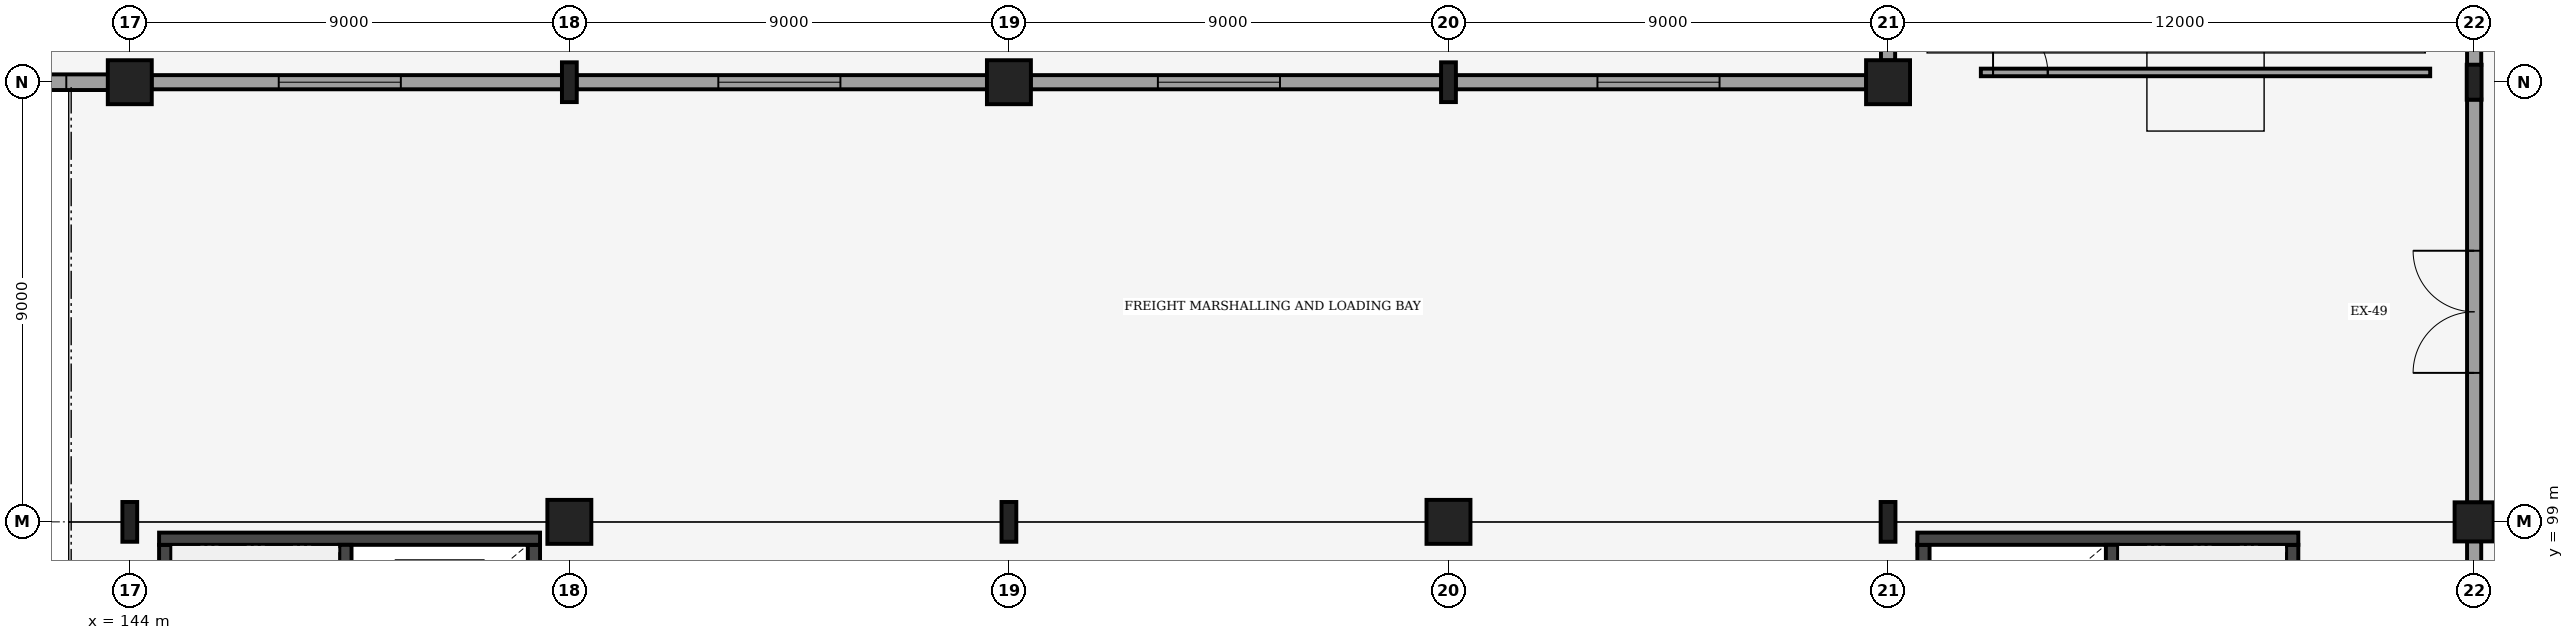
"""IFC4 building model, lengths in metres.
Left out: names, types, materials, properties, quantities, classifications, styles, units other than length and angle.
Written with IfcOpenShell. Run it as: python <this file> out.ifc"""

import sys

from ifc_helpers import new_model, si_unit, direction, frame, frame_2d, origin, origin_2d, place, context, subcontext, project, spatial, rectangle, i_section, extrude, element, fill, save


model = new_model("IFC4")
c1 = context("Model", 3, precision=1e-05, world=origin(), true_north=direction((0.0, 1.0)))
c2 = subcontext(c1, "Body", "Model", "MODEL_VIEW")
j1 = project(units=[si_unit("LENGTHUNIT", "METRE"), si_unit("PLANEANGLEUNIT", "RADIAN")], contexts=[c1])
p1 = place(None, origin())
s1 = spatial("IfcSite", under=j1, at=p1, CompositionType="ELEMENT")
p2 = place(p1, origin())
s2 = spatial("IfcBuilding", under=s1, at=p2, CompositionType="ELEMENT")
p3 = place(p2, origin())
s3 = spatial("IfcBuildingStorey", under=s2, at=p3, CompositionType="ELEMENT", Elevation=0.0)
p4 = place(p3, frame((144.0, 99.0, 0.0), z_axis=(0.0, 0.0, 1.0), x_axis=(1.0, 0.0, 0.0)))
e1 = element("IfcColumn", 1, at=p4, inside=s3, PredefinedType="COLUMN", context=c2, shape_type="SweptSolid", body=[
    extrude(i_section(OverallWidth=0.303, OverallDepth=0.814, WebThickness=0.021, FlangeThickness=0.04, FilletRadius=0.03, at=origin_2d()), origin(), (0.0, 0.0, 1.0), 6.0),
])
for number, where, z_axis, x_axis in (
    (2, (144.0, 108.0, 0.0), (0.0, 0.0, 1.0), (1.0, 0.0, 0.0)),
    (3, (153.0, 99.0, 0.0), (0.0, 0.0, 1.0), (1.0, 0.0, 0.0)),
):
    element("IfcColumn", number, at=place(p3, frame(where, z_axis=z_axis, x_axis=x_axis)), inside=s3, PredefinedType="COLUMN", context=c2, shape_type="SweptSolid", body=[
        extrude(rectangle(XDim=0.9, YDim=0.9, at=origin_2d()), origin(), (0.0, 0.0, 1.0), 6.0),
    ])
for number, where, z_axis, x_axis in (
    (4, (153.0, 108.0, 0.0), (0.0, 0.0, 1.0), (1.0, 0.0, 0.0)),
    (5, (162.0, 99.0, 0.0), (0.0, 0.0, 1.0), (1.0, 0.0, 0.0)),
):
    element("IfcColumn", number, at=place(p3, frame(where, z_axis=z_axis, x_axis=x_axis)), inside=s3, PredefinedType="COLUMN", context=c2, shape_type="SweptSolid", body=[
        extrude(i_section(OverallWidth=0.303, OverallDepth=0.814, WebThickness=0.021, FlangeThickness=0.04, FilletRadius=0.03, at=origin_2d()), origin(), (0.0, 0.0, 1.0), 6.0),
    ])
for number, where, z_axis, x_axis in (
    (6, (162.0, 108.0, 0.0), (0.0, 0.0, 1.0), (1.0, 0.0, 0.0)),
    (7, (171.0, 99.0, 0.0), (0.0, 0.0, 1.0), (1.0, 0.0, 0.0)),
):
    element("IfcColumn", number, at=place(p3, frame(where, z_axis=z_axis, x_axis=x_axis)), inside=s3, PredefinedType="COLUMN", context=c2, shape_type="SweptSolid", body=[
        extrude(rectangle(XDim=0.9, YDim=0.9, at=origin_2d()), origin(), (0.0, 0.0, 1.0), 6.0),
    ])
for number, where, z_axis, x_axis in (
    (8, (171.0, 108.0, 0.0), (0.0, 0.0, 1.0), (1.0, 0.0, 0.0)),
    (9, (180.0, 99.0, 0.0), (0.0, 0.0, 1.0), (1.0, 0.0, 0.0)),
):
    element("IfcColumn", number, at=place(p3, frame(where, z_axis=z_axis, x_axis=x_axis)), inside=s3, PredefinedType="COLUMN", context=c2, shape_type="SweptSolid", body=[
        extrude(i_section(OverallWidth=0.303, OverallDepth=0.814, WebThickness=0.021, FlangeThickness=0.04, FilletRadius=0.03, at=origin_2d()), origin(), (0.0, 0.0, 1.0), 6.0),
    ])
p5 = place(p3, frame((180.0, 108.0, 0.0), z_axis=(0.0, 0.0, 1.0), x_axis=(1.0, 0.0, 0.0)))
e10 = element("IfcColumn", 10, at=p5, inside=s3, PredefinedType="COLUMN", context=c2, shape_type="SweptSolid", body=[
    extrude(rectangle(XDim=0.9, YDim=0.9, at=origin_2d()), origin(), (0.0, 0.0, 1.0), 6.0),
])
p6 = place(p3, frame((192.0, 99.0, 0.0), z_axis=(0.0, 0.0, 1.0), x_axis=(1.0, 0.0, 0.0)))
e11 = element("IfcColumn", 11, at=p6, inside=s3, PredefinedType="COLUMN", context=c2, shape_type="SweptSolid", body=[
    extrude(rectangle(XDim=0.8, YDim=0.8, at=origin_2d()), origin(), (0.0, 0.0, 1.0), 6.0),
])
p7 = place(p3, frame((192.0, 108.0, 0.0), z_axis=(0.0, 0.0, 1.0), x_axis=(1.0, 0.0, 0.0)))
e12 = element("IfcColumn", 12, at=p7, inside=s3, PredefinedType="COLUMN", context=c2, shape_type="SweptSolid", body=[
    extrude(i_section(OverallWidth=0.304, OverallDepth=0.716, WebThickness=0.021, FlangeThickness=0.04, FilletRadius=0.027, at=origin_2d()), origin(), (0.0, 0.0, 1.0), 6.0),
])
p8 = place(p3, frame((192.0, 90.353, 0.0), z_axis=(0.0, 0.0, 1.0), x_axis=(0.0, 1.0, 0.0)))
e13 = element("IfcWall", 13, at=p8, inside=s3, PredefinedType="SOLIDWALL", context=c2, shape_type="SweptSolid", body=[
    extrude(rectangle(XDim=8.252, YDim=0.29, at=frame_2d((4.126, 0.0))), origin(), (0.0, 0.0, 1.0), 4.95),
])
p9 = place(p8, frame((2.697, 0.0, 0.0)))
e14 = element("IfcOpeningElement", 14, at=p9, cuts=e13, PredefinedType="OPENING", context=c2, shape_type="SweptSolid", body=[
    extrude(rectangle(XDim=1.9, YDim=2.2, at=frame_2d((0.95, 1.1))), frame((0.0, 0.155, 0.0), z_axis=(0.0, -1.0, 0.0), x_axis=(1.0, 0.0, 0.0)), (0.0, 0.0, 1.0), 0.31),
])
p10 = place(p3, frame((192.0, 99.395, 0.0), z_axis=(0.0, 0.0, 1.0), x_axis=(0.0, 1.0, 0.0)))
e15 = element("IfcWall", 15, at=p10, inside=s3, PredefinedType="SOLIDWALL", context=c2, shape_type="SweptSolid", body=[
    extrude(rectangle(XDim=8.252, YDim=0.29, at=frame_2d((4.126, 0.0))), origin(), (0.0, 0.0, 1.0), 4.95),
])
p11 = place(p10, frame((2.655, 0.0, 0.0)))
e16 = element("IfcOpeningElement", 16, at=p11, cuts=e15, PredefinedType="OPENING", context=c2, shape_type="SweptSolid", body=[
    extrude(rectangle(XDim=2.5, YDim=2.5, at=frame_2d((1.25, 1.25))), frame((0.0, 0.155, 0.0), z_axis=(0.0, -1.0, 0.0), x_axis=(1.0, 0.0, 0.0)), (0.0, 0.0, 1.0), 0.31),
])
p12 = place(p3, frame((192.0, 108.353, 0.0), z_axis=(0.0, 0.0, 1.0), x_axis=(0.0, 1.0, 0.0)))
e17 = element("IfcWall", 17, at=p12, inside=s3, PredefinedType="SOLIDWALL", context=c2, shape_type="SweptSolid", body=[
    extrude(rectangle(XDim=8.252, YDim=0.29, at=frame_2d((4.126, 0.0))), origin(), (0.0, 0.0, 1.0), 4.95),
])
p13 = place(p12, frame((1.597, 0.0, 0.85)))
e18 = element("IfcOpeningElement", 18, at=p13, cuts=e17, PredefinedType="OPENING", context=c2, shape_type="SweptSolid", body=[
    extrude(rectangle(XDim=2.2, YDim=2.1, at=frame_2d((1.1, 1.05))), frame((0.0, 0.155, 0.0), z_axis=(0.0, -1.0, 0.0), x_axis=(1.0, 0.0, 0.0)), (0.0, 0.0, 1.0), 0.31),
])
p14 = place(p12, frame((4.997, 0.0, 0.85)))
e19 = element("IfcOpeningElement", 19, at=p14, cuts=e17, PredefinedType="OPENING", context=c2, shape_type="SweptSolid", body=[
    extrude(rectangle(XDim=2.0, YDim=2.1, at=frame_2d((1.0, 1.05))), frame((0.0, 0.155, 0.0), z_axis=(0.0, -1.0, 0.0), x_axis=(1.0, 0.0, 0.0)), (0.0, 0.0, 1.0), 0.31),
])
p15 = place(p3, frame((135.146, 108.0, 0.0), z_axis=(0.0, 0.0, 1.0), x_axis=(1.0, 0.0, 0.0)))
e20 = element("IfcWall", 20, at=p15, inside=s3, PredefinedType="SOLIDWALL", context=c2, shape_type="SweptSolid", body=[
    extrude(rectangle(XDim=8.408, YDim=0.32, at=frame_2d((4.204, 0.0))), origin(), (0.0, 0.0, 1.0), 4.95),
])
p16 = place(p15, frame((1.154, 0.0, 0.0)))
e21 = element("IfcOpeningElement", 21, at=p16, cuts=e20, PredefinedType="OPENING", context=c2, shape_type="SweptSolid", body=[
    extrude(rectangle(XDim=6.4, YDim=3.2, at=frame_2d((3.2, 1.6))), frame((0.0, 0.17, 0.0), z_axis=(0.0, -1.0, 0.0), x_axis=(1.0, 0.0, 0.0)), (0.0, 0.0, 1.0), 0.34),
])
p17 = place(p3, frame((144.445, 108.0, 0.0), z_axis=(0.0, 0.0, 1.0), x_axis=(1.0, 0.0, 0.0)))
e22 = element("IfcWall", 22, at=p17, inside=s3, PredefinedType="SOLIDWALL", context=c2, shape_type="SweptSolid", body=[
    extrude(rectangle(XDim=8.408, YDim=0.29, at=frame_2d((4.204, 0.0))), origin(), (0.0, 0.0, 1.0), 4.95),
])
p18 = place(p17, frame((2.605, 0.0, 3.3)))
e23 = element("IfcOpeningElement", 23, at=p18, cuts=e22, PredefinedType="OPENING", context=c2, shape_type="SweptSolid", body=[
    extrude(rectangle(XDim=2.5, YDim=1.15, at=frame_2d((1.25, 0.575))), frame((0.0, 0.155, 0.0), z_axis=(0.0, -1.0, 0.0), x_axis=(1.0, 0.0, 0.0)), (0.0, 0.0, 1.0), 0.31),
])
p19 = place(p3, frame((153.146, 108.0, 0.0), z_axis=(0.0, 0.0, 1.0), x_axis=(1.0, 0.0, 0.0)))
e24 = element("IfcWall", 24, at=p19, inside=s3, PredefinedType="SOLIDWALL", context=c2, shape_type="SweptSolid", body=[
    extrude(rectangle(XDim=8.408, YDim=0.29, at=frame_2d((4.204, 0.0))), origin(), (0.0, 0.0, 1.0), 4.95),
])
p20 = place(p19, frame((2.904, 0.0, 3.3)))
e25 = element("IfcOpeningElement", 25, at=p20, cuts=e24, PredefinedType="OPENING", context=c2, shape_type="SweptSolid", body=[
    extrude(rectangle(XDim=2.5, YDim=1.15, at=frame_2d((1.25, 0.575))), frame((0.0, 0.155, 0.0), z_axis=(0.0, -1.0, 0.0), x_axis=(1.0, 0.0, 0.0)), (0.0, 0.0, 1.0), 0.31),
])
p21 = place(p3, frame((162.445, 108.0, 0.0), z_axis=(0.0, 0.0, 1.0), x_axis=(1.0, 0.0, 0.0)))
e26 = element("IfcWall", 26, at=p21, inside=s3, PredefinedType="SOLIDWALL", context=c2, shape_type="SweptSolid", body=[
    extrude(rectangle(XDim=8.408, YDim=0.29, at=frame_2d((4.204, 0.0))), origin(), (0.0, 0.0, 1.0), 4.95),
])
p22 = place(p21, frame((2.605, 0.0, 3.3)))
e27 = element("IfcOpeningElement", 27, at=p22, cuts=e26, PredefinedType="OPENING", context=c2, shape_type="SweptSolid", body=[
    extrude(rectangle(XDim=2.5, YDim=1.15, at=frame_2d((1.25, 0.575))), frame((0.0, 0.155, 0.0), z_axis=(0.0, -1.0, 0.0), x_axis=(1.0, 0.0, 0.0)), (0.0, 0.0, 1.0), 0.31),
])
p23 = place(p3, frame((171.146, 108.0, 0.0), z_axis=(0.0, 0.0, 1.0), x_axis=(1.0, 0.0, 0.0)))
e28 = element("IfcWall", 28, at=p23, inside=s3, PredefinedType="SOLIDWALL", context=c2, shape_type="SweptSolid", body=[
    extrude(rectangle(XDim=8.408, YDim=0.29, at=frame_2d((4.204, 0.0))), origin(), (0.0, 0.0, 1.0), 4.95),
])
p24 = place(p23, frame((2.904, 0.0, 3.3)))
e29 = element("IfcOpeningElement", 29, at=p24, cuts=e28, PredefinedType="OPENING", context=c2, shape_type="SweptSolid", body=[
    extrude(rectangle(XDim=2.5, YDim=1.15, at=frame_2d((1.25, 0.575))), frame((0.0, 0.155, 0.0), z_axis=(0.0, -1.0, 0.0), x_axis=(1.0, 0.0, 0.0)), (0.0, 0.0, 1.0), 0.31),
])
p25 = place(p3, frame((180.0, 108.445, 0.0), z_axis=(0.0, 0.0, 1.0), x_axis=(0.0, 1.0, 0.0)))
e30 = element("IfcWall", 30, at=p25, inside=s3, PredefinedType="SOLIDWALL", context=c2, shape_type="SweptSolid", body=[
    extrude(rectangle(XDim=26.153, YDim=0.29, at=frame_2d((13.076, 0.0))), origin(), (0.0, 0.0, 1.0), 4.95),
])
p26 = place(p3, frame((180.725, 90.47, 0.0), z_axis=(0.0, 0.0, 1.0), x_axis=(0.0, 1.0, 0.0)))
e31 = element("IfcWall", 31, at=p26, inside=s3, PredefinedType="SHEAR", context=c2, shape_type="SweptSolid", body=[
    extrude(rectangle(XDim=8.06, YDim=0.25, at=frame_2d((4.03, 0.0))), origin(), (0.0, 0.0, 1.0), 5.64),
])
p27 = place(p26, frame((1.15, 0.0, 0.0)))
e32 = element("IfcOpeningElement", 32, at=p27, cuts=e31, PredefinedType="OPENING", context=c2, shape_type="SweptSolid", body=[
    extrude(rectangle(XDim=1.6, YDim=2.2, at=frame_2d((0.8, 1.1))), frame((0.0, 0.135, 0.0), z_axis=(0.0, -1.0, 0.0), x_axis=(1.0, 0.0, 0.0)), (0.0, 0.0, 1.0), 0.27),
])
p28 = place(p3, frame((188.275, 90.47, 0.0), z_axis=(0.0, 0.0, 1.0), x_axis=(0.0, 1.0, 0.0)))
e33 = element("IfcWall", 33, at=p28, inside=s3, PredefinedType="SHEAR", context=c2, shape_type="SweptSolid", body=[
    extrude(rectangle(XDim=8.06, YDim=0.25, at=frame_2d((4.03, 0.0))), origin(), (0.0, 0.0, 1.0), 5.64),
])
p29 = place(p3, frame((180.6, 98.655, 0.0), z_axis=(0.0, 0.0, 1.0), x_axis=(1.0, 0.0, 0.0)))
e34 = element("IfcWall", 34, at=p29, inside=s3, PredefinedType="SHEAR", context=c2, shape_type="SweptSolid", body=[
    extrude(rectangle(XDim=7.8, YDim=0.25, at=frame_2d((3.9, 0.0))), origin(), (0.0, 0.0, 1.0), 5.64),
])
p30 = place(p3, frame((184.585, 90.47, 0.0), z_axis=(0.0, 0.0, 1.0), x_axis=(0.0, 1.0, 0.0)))
e35 = element("IfcWall", 35, at=p30, inside=s3, PredefinedType="SHEAR", context=c2, shape_type="SweptSolid", body=[
    extrude(rectangle(XDim=8.06, YDim=0.25, at=frame_2d((4.03, 0.0))), origin(), (0.0, 0.0, 1.0), 5.64),
])
p31 = place(p30, frame((0.25, 0.0, 0.0)))
e36 = element("IfcOpeningElement", 36, at=p31, cuts=e35, PredefinedType="OPENING", context=c2, shape_type="SweptSolid", body=[
    extrude(rectangle(XDim=1.15, YDim=2.15, at=frame_2d((0.575, 1.075))), frame((0.0, 0.135, 0.0), z_axis=(0.0, -1.0, 0.0), x_axis=(1.0, 0.0, 0.0)), (0.0, 0.0, 1.0), 0.27),
])
p32 = place(p3, frame((144.725, 90.47, 0.0), z_axis=(0.0, 0.0, 1.0), x_axis=(0.0, 1.0, 0.0)))
e37 = element("IfcWall", 37, at=p32, inside=s3, PredefinedType="SHEAR", context=c2, shape_type="SweptSolid", body=[
    extrude(rectangle(XDim=8.06, YDim=0.25, at=frame_2d((4.03, 0.0))), origin(), (0.0, 0.0, 1.0), 5.64),
])
p33 = place(p3, frame((152.275, 90.47, 0.0), z_axis=(0.0, 0.0, 1.0), x_axis=(0.0, 1.0, 0.0)))
e38 = element("IfcWall", 38, at=p33, inside=s3, PredefinedType="SHEAR", context=c2, shape_type="SweptSolid", body=[
    extrude(rectangle(XDim=8.06, YDim=0.25, at=frame_2d((4.03, 0.0))), origin(), (0.0, 0.0, 1.0), 5.64),
])
p34 = place(p33, frame((1.15, 0.0, 0.0)))
e39 = element("IfcOpeningElement", 39, at=p34, cuts=e38, PredefinedType="OPENING", context=c2, shape_type="SweptSolid", body=[
    extrude(rectangle(XDim=1.8, YDim=2.2, at=frame_2d((0.9, 1.1))), frame((0.0, 0.135, 0.0), z_axis=(0.0, -1.0, 0.0), x_axis=(1.0, 0.0, 0.0)), (0.0, 0.0, 1.0), 0.27),
])
p35 = place(p3, frame((144.6, 98.655, 0.0), z_axis=(0.0, 0.0, 1.0), x_axis=(1.0, 0.0, 0.0)))
e40 = element("IfcWall", 40, at=p35, inside=s3, PredefinedType="SHEAR", context=c2, shape_type="SweptSolid", body=[
    extrude(rectangle(XDim=7.8, YDim=0.25, at=frame_2d((3.9, 0.0))), origin(), (0.0, 0.0, 1.0), 5.64),
])
p36 = place(p3, frame((148.415, 90.47, 0.0), z_axis=(0.0, 0.0, 1.0), x_axis=(0.0, 1.0, 0.0)))
e41 = element("IfcWall", 41, at=p36, inside=s3, PredefinedType="SHEAR", context=c2, shape_type="SweptSolid", body=[
    extrude(rectangle(XDim=8.06, YDim=0.25, at=frame_2d((4.03, 0.0))), origin(), (0.0, 0.0, 1.0), 5.64),
])
p37 = place(p36, frame((0.25, 0.0, 0.0)))
e42 = element("IfcOpeningElement", 42, at=p37, cuts=e41, PredefinedType="OPENING", context=c2, shape_type="SweptSolid", body=[
    extrude(rectangle(XDim=1.15, YDim=2.15, at=frame_2d((0.575, 1.075))), frame((0.0, 0.135, 0.0), z_axis=(0.0, -1.0, 0.0), x_axis=(1.0, 0.0, 0.0)), (0.0, 0.0, 1.0), 0.27),
])
p38 = place(p3, frame((181.9, 108.2, 0.0), z_axis=(0.0, 0.0, 1.0), x_axis=(1.0, 0.0, 0.0)))
e43 = element("IfcWall", 43, at=p38, inside=s3, PredefinedType="PARTITIONING", context=c2, shape_type="SweptSolid", body=[
    extrude(rectangle(XDim=9.2, YDim=0.155, at=frame_2d((4.6, 0.0))), origin(), (0.0, 0.0, 1.0), 4.85),
])
p39 = place(p38, frame((0.25, 0.0, 0.0)))
e44 = element("IfcOpeningElement", 44, at=p39, cuts=e43, PredefinedType="OPENING", context=c2, shape_type="SweptSolid", body=[
    extrude(rectangle(XDim=1.12, YDim=2.2, at=frame_2d((0.56, 1.1))), frame((0.0, 0.087, 0.0), z_axis=(0.0, -1.0, 0.0), x_axis=(1.0, 0.0, 0.0)), (0.0, 0.0, 1.0), 0.175),
])
p40 = place(p11, origin())
e45 = element("IfcDoor", 45, at=p40, inside=s3, OperationType="DOUBLE_DOOR_SINGLE_SWING", PredefinedType="DOOR", context=c2, shape_type="SweptSolid", body=[
    extrude(rectangle(XDim=2.5, YDim=2.5, at=frame_2d((1.25, 1.25))), frame((0.0, 0.025, 0.0), z_axis=(0.0, -1.0, 0.0), x_axis=(1.0, 0.0, 0.0)), (0.0, 0.0, 1.0), 0.05),
])
fill(e16, e45)
p41 = place(p16, origin())
e46 = element("IfcDoor", 46, at=p41, inside=s3, OperationType="ROLLINGUP", PredefinedType="GATE", context=c2, shape_type="SweptSolid", body=[
    extrude(rectangle(XDim=6.4, YDim=3.2, at=frame_2d((3.2, 1.6))), frame((0.0, 0.025, 0.0), z_axis=(0.0, -1.0, 0.0), x_axis=(1.0, 0.0, 0.0)), (0.0, 0.0, 1.0), 0.05),
])
fill(e21, e46)
p42 = place(p18, origin())
e47 = element("IfcWindow", 47, at=p42, inside=s3, PartitioningType="SINGLE_PANEL", PredefinedType="WINDOW", context=c2, shape_type="SweptSolid", body=[
    extrude(rectangle(XDim=2.5, YDim=1.15, at=frame_2d((1.25, 0.575))), frame((0.0, 0.03, 0.0), z_axis=(0.0, -1.0, 0.0), x_axis=(1.0, 0.0, 0.0)), (0.0, 0.0, 1.0), 0.06),
])
fill(e23, e47)
p43 = place(p20, origin())
e48 = element("IfcWindow", 48, at=p43, inside=s3, PartitioningType="SINGLE_PANEL", PredefinedType="WINDOW", context=c2, shape_type="SweptSolid", body=[
    extrude(rectangle(XDim=2.5, YDim=1.15, at=frame_2d((1.25, 0.575))), frame((0.0, 0.03, 0.0), z_axis=(0.0, -1.0, 0.0), x_axis=(1.0, 0.0, 0.0)), (0.0, 0.0, 1.0), 0.06),
])
fill(e25, e48)
p44 = place(p22, origin())
e49 = element("IfcWindow", 49, at=p44, inside=s3, PartitioningType="SINGLE_PANEL", PredefinedType="WINDOW", context=c2, shape_type="SweptSolid", body=[
    extrude(rectangle(XDim=2.5, YDim=1.15, at=frame_2d((1.25, 0.575))), frame((0.0, 0.03, 0.0), z_axis=(0.0, -1.0, 0.0), x_axis=(1.0, 0.0, 0.0)), (0.0, 0.0, 1.0), 0.06),
])
fill(e27, e49)
p45 = place(p24, origin())
e50 = element("IfcWindow", 50, at=p45, inside=s3, PartitioningType="SINGLE_PANEL", PredefinedType="WINDOW", context=c2, shape_type="SweptSolid", body=[
    extrude(rectangle(XDim=2.5, YDim=1.15, at=frame_2d((1.25, 0.575))), frame((0.0, 0.03, 0.0), z_axis=(0.0, -1.0, 0.0), x_axis=(1.0, 0.0, 0.0)), (0.0, 0.0, 1.0), 0.06),
])
fill(e29, e50)
p46 = place(p39, origin())
e51 = element("IfcDoor", 51, at=p46, inside=s3, OperationType="SINGLE_SWING_LEFT", PredefinedType="DOOR", context=c2, shape_type="SweptSolid", body=[
    extrude(rectangle(XDim=1.12, YDim=2.2, at=frame_2d((0.56, 1.1))), frame((0.0, 0.025, 0.0), z_axis=(0.0, -1.0, 0.0), x_axis=(1.0, 0.0, 0.0)), (0.0, 0.0, 1.0), 0.05),
])
fill(e44, e51)
save(model, sys.argv[1])
